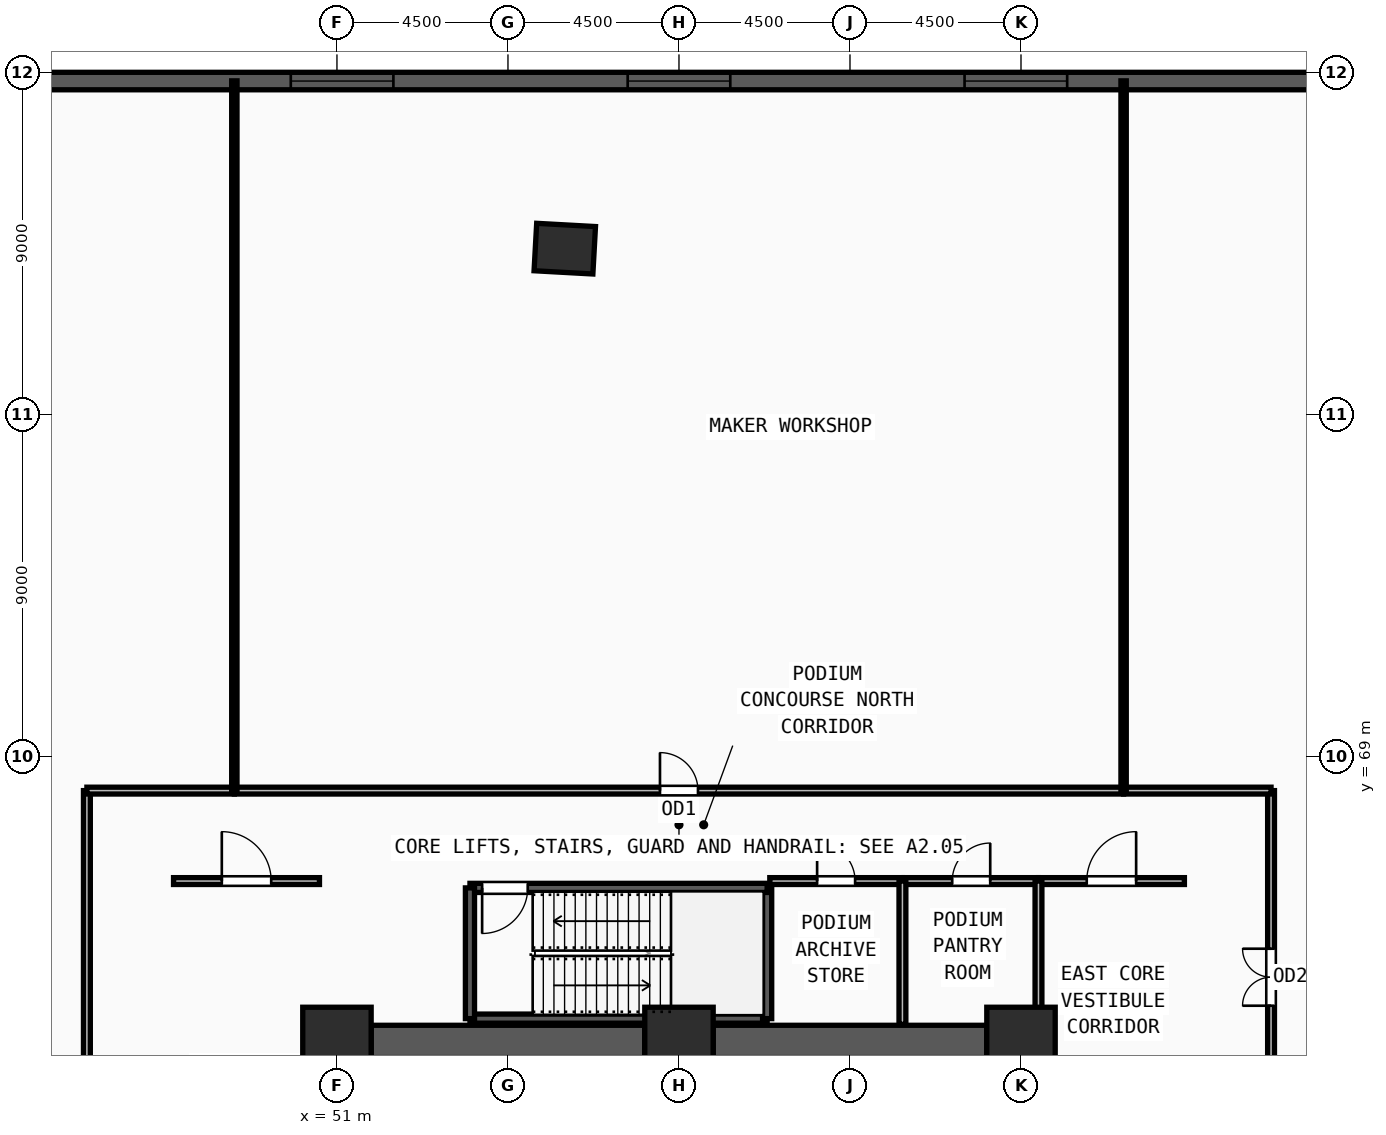
"""IFC4 building model, lengths in metres.
Left out: names, types, materials, properties, quantities, classifications, styles, units other than length and angle.
Written with IfcOpenShell. Run it as: python <this file> out.ifc"""

import sys

from ifc_helpers import new_model, si_unit, direction, frame, frame_2d, origin, origin_2d, place, context, subcontext, project, spatial, rectangle, extrude, source, transform, mapped, element, fill, save


model = new_model("IFC4")
c1 = context("Model", 3, precision=1e-05, world=origin(), true_north=direction((0.0, 1.0)))
c2 = subcontext(c1, "Body", "Model", "MODEL_VIEW")
j1 = project(units=[si_unit("LENGTHUNIT", "METRE"), si_unit("PLANEANGLEUNIT", "RADIAN")], contexts=[c1])
p1 = place(None, origin())
s1 = spatial("IfcSite", under=j1, at=p1, CompositionType="ELEMENT")
p2 = place(p1, origin())
s2 = spatial("IfcBuilding", under=s1, at=p2, CompositionType="ELEMENT")
p3 = place(p2, frame((0.0, 0.0, 18.9)))
s3 = spatial("IfcBuildingStorey", under=s2, at=p3, CompositionType="ELEMENT", Elevation=18.9)
m1 = source(origin(), c2, "Body", "SweptSolid", [
    extrude(rectangle(XDim=1.8, YDim=1.8, at=origin_2d()), origin(), (0.0, 0.0, 1.0), 4.5),
])
for number, where, z_axis, x_axis in (
    (1, (69.0, 61.5, 0.0), (0.0, 0.0, 1.0), (1.0, 0.0, 0.0)),
    (2, (60.0, 61.5, 0.0), (0.0, 0.0, 1.0), (1.0, 0.0, 0.0)),
    (3, (51.0, 61.5, 0.0), (0.0, 0.0, 1.0), (1.0, 0.0, 0.0)),
):
    element("IfcColumn", number, at=place(p3, frame(where, z_axis=z_axis, x_axis=x_axis)), inside=s3, PredefinedType="COLUMN", context=c2, shape_type="MappedRepresentation", body=[
        mapped(m1, transform((0.0, 0.0, 0.0), x_axis=(1.0, 0.0, 0.0), y_axis=(0.0, 1.0, 0.0), z_axis=(0.0, 0.0, 1.0), scale=1.0)),
    ])
m2 = source(origin(), c2, "Body", "SweptSolid", [
    extrude(rectangle(XDim=1.55, YDim=1.25, at=origin_2d()), origin(), (0.0, 0.0, 1.0), 4.5),
])
p4 = place(p3, frame((56.995, 82.36, 0.0), z_axis=(0.0, 0.0, 1.0), x_axis=(-0.998479491627, 0.055124448298, 0.0)))
e4 = element("IfcColumn", 4, at=p4, inside=s3, PredefinedType="COLUMN", context=c2, shape_type="MappedRepresentation", body=[
    mapped(m2, transform((0.0, 0.0, 0.0), x_axis=(1.0, 0.0, 0.0), y_axis=(0.0, 1.0, 0.0), z_axis=(0.0, 0.0, 1.0), scale=1.0)),
])
p5 = place(p3, frame((95.46, 86.77, 0.0), z_axis=(0.0, 0.0, 1.0), x_axis=(-1.0, 0.0, 0.0)))
e5 = element("IfcWall", 5, at=p5, inside=s3, PredefinedType="SOLIDWALL", context=c2, shape_type="SweptSolid", body=[
    extrude(rectangle(XDim=70.92, YDim=0.46, at=frame_2d((35.46, 0.0))), origin(), (0.0, 0.0, 1.0), 3.6),
])
m3 = source(origin(), c2, "Body", "SweptSolid", [
    extrude(rectangle(XDim=2.7, YDim=2.35, at=frame_2d((1.35, 1.175))), frame((0.0, 0.24, 0.0), z_axis=(0.0, -1.0, 0.0), x_axis=(1.0, 0.0, 0.0)), (0.0, 0.0, 1.0), 0.48),
])
p6 = place(p5, frame((7.515, 0.0, 0.55)))
e6 = element("IfcOpeningElement", 6, at=p6, cuts=e5, PredefinedType="OPENING", context=c2, shape_type="MappedRepresentation", body=[
    mapped(m3, transform((0.0, 0.0, 0.0), x_axis=(1.0, 0.0, 0.0), y_axis=(0.0, 1.0, 0.0), z_axis=(0.0, 0.0, 1.0), scale=1.0)),
])
p7 = place(p5, frame((25.245, 0.0, 0.55)))
e7 = element("IfcOpeningElement", 7, at=p7, cuts=e5, PredefinedType="OPENING", context=c2, shape_type="MappedRepresentation", body=[
    mapped(m3, transform((0.0, 0.0, 0.0), x_axis=(1.0, 0.0, 0.0), y_axis=(0.0, 1.0, 0.0), z_axis=(0.0, 0.0, 1.0), scale=1.0)),
])
p8 = place(p5, frame((34.11, 0.0, 0.55)))
e8 = element("IfcOpeningElement", 8, at=p8, cuts=e5, PredefinedType="OPENING", context=c2, shape_type="MappedRepresentation", body=[
    mapped(m3, transform((0.0, 0.0, 0.0), x_axis=(1.0, 0.0, 0.0), y_axis=(0.0, 1.0, 0.0), z_axis=(0.0, 0.0, 1.0), scale=1.0)),
])
p9 = place(p5, frame((42.975, 0.0, 0.55)))
e9 = element("IfcOpeningElement", 9, at=p9, cuts=e5, PredefinedType="OPENING", context=c2, shape_type="MappedRepresentation", body=[
    mapped(m3, transform((0.0, 0.0, 0.0), x_axis=(1.0, 0.0, 0.0), y_axis=(0.0, 1.0, 0.0), z_axis=(0.0, 0.0, 1.0), scale=1.0)),
])
p10 = place(p5, frame((60.705, 0.0, 0.55)))
e10 = element("IfcOpeningElement", 10, at=p10, cuts=e5, PredefinedType="OPENING", context=c2, shape_type="MappedRepresentation", body=[
    mapped(m3, transform((0.0, 0.0, 0.0), x_axis=(1.0, 0.0, 0.0), y_axis=(0.0, 1.0, 0.0), z_axis=(0.0, 0.0, 1.0), scale=1.0)),
])
for number, where, z_axis, x_axis in (
    (11, (51.9, 61.5, 0.0), (0.0, 0.0, 1.0), (1.0, 0.0, 0.0)),
    (12, (60.9, 61.5, 0.0), (0.0, 0.0, 1.0), (1.0, 0.0, 0.0)),
):
    element("IfcWall", number, at=place(p3, frame(where, z_axis=z_axis, x_axis=x_axis)), inside=s3, PredefinedType="SHEAR", context=c2, shape_type="SweptSolid", body=[
        extrude(rectangle(XDim=7.2, YDim=0.85, at=frame_2d((3.6, 0.0))), origin(), (0.0, 0.0, 1.0), 3.6),
    ])
p11 = place(p3, frame((54.5, 62.1, 0.0), z_axis=(0.0, 0.0, 1.0), x_axis=(1.0, 0.0, 0.0)))
e13 = element("IfcWall", 13, at=p11, inside=s3, PredefinedType="SOLIDWALL", context=c2, shape_type="SweptSolid", body=[
    extrude(rectangle(XDim=7.82, YDim=0.24, at=frame_2d((3.91, 0.0))), origin(), (0.0, 0.0, 1.0), 3.6),
])
p12 = place(p3, frame((62.32, 62.1, 0.0), z_axis=(0.0, 0.0, 1.0), x_axis=(0.0, 1.0, 0.0)))
e14 = element("IfcWall", 14, at=p12, inside=s3, PredefinedType="SOLIDWALL", context=c2, shape_type="SweptSolid", body=[
    extrude(rectangle(XDim=3.44, YDim=0.24, at=frame_2d((1.72, 0.0))), origin(), (0.0, 0.0, 1.0), 3.6),
])
p13 = place(p3, frame((62.32, 65.54, 0.0), z_axis=(0.0, 0.0, 1.0), x_axis=(-1.0, 0.0, 0.0)))
e15 = element("IfcWall", 15, at=p13, inside=s3, PredefinedType="SOLIDWALL", context=c2, shape_type="SweptSolid", body=[
    extrude(rectangle(XDim=7.82, YDim=0.24, at=frame_2d((3.91, 0.0))), origin(), (0.0, 0.0, 1.0), 3.6),
])
m4 = source(origin(), c2, "Body", "SweptSolid", [
    extrude(rectangle(XDim=1.2, YDim=2.2, at=frame_2d((0.6, 1.1))), frame((0.0, 0.13, 0.0), z_axis=(0.0, -1.0, 0.0), x_axis=(1.0, 0.0, 0.0)), (0.0, 0.0, 1.0), 0.26),
])
p14 = place(p13, frame((6.3, 0.0, 0.0)))
e16 = element("IfcOpeningElement", 16, at=p14, cuts=e15, PredefinedType="OPENING", context=c2, shape_type="MappedRepresentation", body=[
    mapped(m4, transform((0.0, 0.0, 0.0), x_axis=(1.0, 0.0, 0.0), y_axis=(0.0, 1.0, 0.0), z_axis=(0.0, 0.0, 1.0), scale=1.0)),
])
p15 = place(p3, frame((54.5, 65.54, 0.0), z_axis=(0.0, 0.0, 1.0), x_axis=(0.0, -1.0, 0.0)))
e17 = element("IfcWall", 17, at=p15, inside=s3, PredefinedType="SOLIDWALL", context=c2, shape_type="SweptSolid", body=[
    extrude(rectangle(XDim=3.44, YDim=0.24, at=frame_2d((1.72, 0.0))), origin(), (0.0, 0.0, 1.0), 3.6),
])
p16 = place(p3, frame((62.39, 65.72, 0.0), z_axis=(0.0, 0.0, 1.0), x_axis=(1.0, 0.0, 0.0)))
e18 = element("IfcWall", 18, at=p16, inside=s3, PredefinedType="PARTITIONING", context=c2, shape_type="SweptSolid", body=[
    extrude(rectangle(XDim=3.49, YDim=0.18, at=frame_2d((1.745, 0.0))), origin(), (0.0, 0.0, 1.0), 3.6),
])
m5 = source(origin(), c2, "Body", "SweptSolid", [
    extrude(rectangle(XDim=1.0, YDim=2.2, at=frame_2d((0.5, 1.1))), frame((0.0, 0.1, 0.0), z_axis=(0.0, -1.0, 0.0), x_axis=(1.0, 0.0, 0.0)), (0.0, 0.0, 1.0), 0.2),
])
p17 = place(p16, frame((1.245, 0.0, 0.0)))
e19 = element("IfcOpeningElement", 19, at=p17, cuts=e18, PredefinedType="OPENING", context=c2, shape_type="MappedRepresentation", body=[
    mapped(m5, transform((0.0, 0.0, 0.0), x_axis=(1.0, 0.0, 0.0), y_axis=(0.0, 1.0, 0.0), z_axis=(0.0, 0.0, 1.0), scale=1.0)),
])
p18 = place(p3, frame((65.92, 65.72, 0.0), z_axis=(0.0, 0.0, 1.0), x_axis=(1.0, 0.0, 0.0)))
e20 = element("IfcWall", 20, at=p18, inside=s3, PredefinedType="PARTITIONING", context=c2, shape_type="SweptSolid", body=[
    extrude(rectangle(XDim=3.54, YDim=0.18, at=frame_2d((1.77, 0.0))), origin(), (0.0, 0.0, 1.0), 3.6),
])
p19 = place(p18, frame((1.27, 0.0, 0.0)))
e21 = element("IfcOpeningElement", 21, at=p19, cuts=e20, PredefinedType="OPENING", context=c2, shape_type="MappedRepresentation", body=[
    mapped(m5, transform((0.0, 0.0, 0.0), x_axis=(1.0, 0.0, 0.0), y_axis=(0.0, 1.0, 0.0), z_axis=(0.0, 0.0, 1.0), scale=1.0)),
])
p20 = place(p3, frame((46.7, 65.72, 0.0), z_axis=(0.0, 0.0, 1.0), x_axis=(1.0, 0.0, 0.0)))
e22 = element("IfcWall", 22, at=p20, inside=s3, PredefinedType="PARTITIONING", context=c2, shape_type="SweptSolid", body=[
    extrude(rectangle(XDim=3.84, YDim=0.18, at=frame_2d((1.92, 0.0))), origin(), (0.0, 0.0, 1.0), 3.6),
])
m6 = source(origin(), c2, "Body", "SweptSolid", [
    extrude(rectangle(XDim=1.3, YDim=2.2, at=frame_2d((0.65, 1.1))), frame((0.0, 0.1, 0.0), z_axis=(0.0, -1.0, 0.0), x_axis=(1.0, 0.0, 0.0)), (0.0, 0.0, 1.0), 0.2),
])
p21 = place(p20, frame((1.27, 0.0, 0.0)))
e23 = element("IfcOpeningElement", 23, at=p21, cuts=e22, PredefinedType="OPENING", context=c2, shape_type="MappedRepresentation", body=[
    mapped(m6, transform((0.0, 0.0, 0.0), x_axis=(1.0, 0.0, 0.0), y_axis=(0.0, 1.0, 0.0), z_axis=(0.0, 0.0, 1.0), scale=1.0)),
])
p22 = place(p3, frame((69.46, 65.72, 0.0), z_axis=(0.0, 0.0, 1.0), x_axis=(1.0, 0.0, 0.0)))
e24 = element("IfcWall", 24, at=p22, inside=s3, PredefinedType="PARTITIONING", context=c2, shape_type="SweptSolid", body=[
    extrude(rectangle(XDim=3.84, YDim=0.18, at=frame_2d((1.92, 0.0))), origin(), (0.0, 0.0, 1.0), 3.6),
])
p23 = place(p22, frame((1.27, 0.0, 0.0)))
e25 = element("IfcOpeningElement", 25, at=p23, cuts=e24, PredefinedType="OPENING", context=c2, shape_type="MappedRepresentation", body=[
    mapped(m6, transform((0.0, 0.0, 0.0), x_axis=(1.0, 0.0, 0.0), y_axis=(0.0, 1.0, 0.0), z_axis=(0.0, 0.0, 1.0), scale=1.0)),
])
p24 = place(p3, frame((44.42, 46.1, 0.0), z_axis=(0.0, 0.0, 1.0), x_axis=(0.0, 1.0, 0.0)))
e26 = element("IfcWall", 26, at=p24, inside=s3, PredefinedType="PARTITIONING", context=c2, shape_type="SweptSolid", body=[
    extrude(rectangle(XDim=22.0, YDim=0.18, at=frame_2d((11.0, 0.0))), origin(), (0.0, 0.0, 1.0), 3.6),
])
m7 = source(origin(), c2, "Body", "SweptSolid", [
    extrude(rectangle(XDim=1.5, YDim=2.2, at=frame_2d((0.75, 1.1))), frame((0.0, 0.1, 0.0), z_axis=(0.0, -1.0, 0.0), x_axis=(1.0, 0.0, 0.0)), (0.0, 0.0, 1.0), 0.2),
])
p25 = place(p24, frame((10.25, 0.0, 0.0)))
e27 = element("IfcOpeningElement", 27, at=p25, cuts=e26, PredefinedType="OPENING", context=c2, shape_type="MappedRepresentation", body=[
    mapped(m7, transform((0.0, 0.0, 0.0), x_axis=(1.0, 0.0, 0.0), y_axis=(0.0, 1.0, 0.0), z_axis=(0.0, 0.0, 1.0), scale=1.0)),
])
p26 = place(p3, frame((75.58, 58.28, 0.0), z_axis=(0.0, 0.0, 1.0), x_axis=(0.0, 1.0, 0.0)))
e28 = element("IfcWall", 28, at=p26, inside=s3, PredefinedType="PARTITIONING", context=c2, shape_type="SweptSolid", body=[
    extrude(rectangle(XDim=9.82, YDim=0.18, at=frame_2d((4.91, 0.0))), origin(), (0.0, 0.0, 1.0), 3.6),
])
p27 = place(p26, frame((4.16, 0.0, 0.0)))
e29 = element("IfcOpeningElement", 29, at=p27, cuts=e28, PredefinedType="OPENING", context=c2, shape_type="MappedRepresentation", body=[
    mapped(m7, transform((0.0, 0.0, 0.0), x_axis=(1.0, 0.0, 0.0), y_axis=(0.0, 1.0, 0.0), z_axis=(0.0, 0.0, 1.0), scale=1.0)),
])
p28 = place(p3, frame((48.3, 68.1, 0.0), z_axis=(0.0, 0.0, 1.0), x_axis=(1.0, 0.0, 0.0)))
e30 = element("IfcWall", 30, at=p28, inside=s3, PredefinedType="PARTITIONING", context=c2, shape_type="SweptSolid", body=[
    extrude(rectangle(XDim=23.4, YDim=0.18, at=frame_2d((11.7, 0.0))), origin(), (0.0, 0.0, 1.0), 3.6),
])
p29 = place(p28, frame((11.2, 0.0, 0.0)))
e31 = element("IfcOpeningElement", 31, at=p29, cuts=e30, PredefinedType="OPENING", context=c2, shape_type="MappedRepresentation", body=[
    mapped(m5, transform((0.0, 0.0, 0.0), x_axis=(1.0, 0.0, 0.0), y_axis=(0.0, 1.0, 0.0), z_axis=(0.0, 0.0, 1.0), scale=1.0)),
])
for number, where, z_axis, x_axis in (
    (32, (44.42, 68.1, 0.0), (0.0, 0.0, 1.0), (1.0, 0.0, 0.0)),
    (33, (71.7, 68.1, 0.0), (0.0, 0.0, 1.0), (1.0, 0.0, 0.0)),
):
    element("IfcWall", number, at=place(p3, frame(where, z_axis=z_axis, x_axis=x_axis)), inside=s3, PredefinedType="PARTITIONING", context=c2, shape_type="SweptSolid", body=[
        extrude(rectangle(XDim=3.88, YDim=0.18, at=frame_2d((1.94, 0.0))), origin(), (0.0, 0.0, 1.0), 3.6),
    ])
for number, where, z_axis, x_axis in (
    (34, (48.3, 68.1, 0.0), (0.0, 0.0, 1.0), (0.0, 1.0, 0.0)),
    (35, (71.7, 68.1, 0.0), (0.0, 0.0, 1.0), (0.0, 1.0, 0.0)),
):
    element("IfcWall", number, at=place(p3, frame(where, z_axis=z_axis, x_axis=x_axis)), inside=s3, PredefinedType="PARTITIONING", context=c2, shape_type="SweptSolid", body=[
        extrude(rectangle(XDim=18.675, YDim=0.14, at=frame_2d((9.337, 0.0))), origin(), (0.0, 0.0, 1.0), 3.6),
    ])
for number, where, z_axis, x_axis in (
    (36, (65.88, 61.95, 0.0), (0.0, 0.0, 1.0), (0.0, 1.0, 0.0)),
    (37, (69.46, 61.95, 0.0), (0.0, 0.0, 1.0), (0.0, 1.0, 0.0)),
):
    element("IfcWall", number, at=place(p3, frame(where, z_axis=z_axis, x_axis=x_axis)), inside=s3, PredefinedType="PARTITIONING", context=c2, shape_type="SweptSolid", body=[
        extrude(rectangle(XDim=3.77, YDim=0.18, at=frame_2d((1.885, 0.0))), origin(), (0.0, 0.0, 1.0), 3.6),
    ])
m8 = source(origin(), c2, "Body", "SweptSolid", [
    extrude(rectangle(XDim=2.7, YDim=2.35, at=frame_2d((1.35, 1.175))), frame((0.0, 0.03, 0.0), z_axis=(0.0, -1.0, 0.0), x_axis=(1.0, 0.0, 0.0)), (0.0, 0.0, 1.0), 0.06),
])
p30 = place(p7, origin())
e38 = element("IfcWindow", 38, at=p30, inside=s3, PartitioningType="TRIPLE_PANEL_VERTICAL", PredefinedType="WINDOW", context=c2, shape_type="MappedRepresentation", body=[
    mapped(m8, transform((0.0, 0.0, 0.0), x_axis=(1.0, 0.0, 0.0), y_axis=(0.0, 1.0, 0.0), z_axis=(0.0, 0.0, 1.0), scale=1.0)),
])
fill(e7, e38)
p31 = place(p8, origin())
e39 = element("IfcWindow", 39, at=p31, inside=s3, PartitioningType="TRIPLE_PANEL_VERTICAL", PredefinedType="WINDOW", context=c2, shape_type="MappedRepresentation", body=[
    mapped(m8, transform((0.0, 0.0, 0.0), x_axis=(1.0, 0.0, 0.0), y_axis=(0.0, 1.0, 0.0), z_axis=(0.0, 0.0, 1.0), scale=1.0)),
])
fill(e8, e39)
p32 = place(p9, origin())
e40 = element("IfcWindow", 40, at=p32, inside=s3, PartitioningType="TRIPLE_PANEL_VERTICAL", PredefinedType="WINDOW", context=c2, shape_type="MappedRepresentation", body=[
    mapped(m8, transform((0.0, 0.0, 0.0), x_axis=(1.0, 0.0, 0.0), y_axis=(0.0, 1.0, 0.0), z_axis=(0.0, 0.0, 1.0), scale=1.0)),
])
fill(e9, e40)
m9 = source(origin(), c2, "Body", "SweptSolid", [
    extrude(rectangle(XDim=1.2, YDim=2.2, at=frame_2d((0.6, 1.1))), frame((0.0, 0.025, 0.0), z_axis=(0.0, -1.0, 0.0), x_axis=(1.0, 0.0, 0.0)), (0.0, 0.0, 1.0), 0.05),
])
p33 = place(p14, origin())
e41 = element("IfcDoor", 41, at=p33, inside=s3, OperationType="SINGLE_SWING_RIGHT", PredefinedType="DOOR", context=c2, shape_type="MappedRepresentation", body=[
    mapped(m9, transform((0.0, 0.0, 0.0), x_axis=(1.0, 0.0, 0.0), y_axis=(0.0, 1.0, 0.0), z_axis=(0.0, 0.0, 1.0), scale=1.0)),
])
fill(e16, e41)
m10 = source(origin(), c2, "Body", "SweptSolid", [
    extrude(rectangle(XDim=1.0, YDim=2.2, at=frame_2d((0.5, 1.1))), frame((0.0, 0.025, 0.0), z_axis=(0.0, -1.0, 0.0), x_axis=(1.0, 0.0, 0.0)), (0.0, 0.0, 1.0), 0.05),
])
p34 = place(p17, origin())
e42 = element("IfcDoor", 42, at=p34, inside=s3, OperationType="SINGLE_SWING_LEFT", PredefinedType="DOOR", context=c2, shape_type="MappedRepresentation", body=[
    mapped(m10, transform((0.0, 0.0, 0.0), x_axis=(1.0, 0.0, 0.0), y_axis=(0.0, 1.0, 0.0), z_axis=(0.0, 0.0, 1.0), scale=1.0)),
])
fill(e19, e42)
p35 = place(p19, origin())
e43 = element("IfcDoor", 43, at=p35, inside=s3, OperationType="SINGLE_SWING_RIGHT", PredefinedType="DOOR", context=c2, shape_type="MappedRepresentation", body=[
    mapped(m10, transform((0.0, 0.0, 0.0), x_axis=(1.0, 0.0, 0.0), y_axis=(0.0, 1.0, 0.0), z_axis=(0.0, 0.0, 1.0), scale=1.0)),
])
fill(e21, e43)
m11 = source(origin(), c2, "Body", "SweptSolid", [
    extrude(rectangle(XDim=1.3, YDim=2.2, at=frame_2d((0.65, 1.1))), frame((0.0, 0.025, 0.0), z_axis=(0.0, -1.0, 0.0), x_axis=(1.0, 0.0, 0.0)), (0.0, 0.0, 1.0), 0.05),
])
p36 = place(p21, origin())
e44 = element("IfcDoor", 44, at=p36, inside=s3, OperationType="SINGLE_SWING_LEFT", PredefinedType="DOOR", context=c2, shape_type="MappedRepresentation", body=[
    mapped(m11, transform((0.0, 0.0, 0.0), x_axis=(1.0, 0.0, 0.0), y_axis=(0.0, 1.0, 0.0), z_axis=(0.0, 0.0, 1.0), scale=1.0)),
])
fill(e23, e44)
p37 = place(p23, origin())
e45 = element("IfcDoor", 45, at=p37, inside=s3, OperationType="SINGLE_SWING_RIGHT", PredefinedType="DOOR", context=c2, shape_type="MappedRepresentation", body=[
    mapped(m11, transform((0.0, 0.0, 0.0), x_axis=(1.0, 0.0, 0.0), y_axis=(0.0, 1.0, 0.0), z_axis=(0.0, 0.0, 1.0), scale=1.0)),
])
fill(e25, e45)
m12 = source(origin(), c2, "Body", "SweptSolid", [
    extrude(rectangle(XDim=1.5, YDim=2.2, at=frame_2d((0.75, 1.1))), frame((0.0, 0.025, 0.0), z_axis=(0.0, -1.0, 0.0), x_axis=(1.0, 0.0, 0.0)), (0.0, 0.0, 1.0), 0.05),
])
p38 = place(p27, origin())
e46 = element("IfcDoor", 46, at=p38, inside=s3, OperationType="DOUBLE_DOOR_SINGLE_SWING", PredefinedType="DOOR", context=c2, shape_type="MappedRepresentation", body=[
    mapped(m12, transform((0.0, 0.0, 0.0), x_axis=(1.0, 0.0, 0.0), y_axis=(0.0, 1.0, 0.0), z_axis=(0.0, 0.0, 1.0), scale=1.0)),
])
fill(e29, e46)
p39 = place(p29, origin())
e47 = element("IfcDoor", 47, at=p39, inside=s3, OperationType="SINGLE_SWING_LEFT", PredefinedType="DOOR", context=c2, shape_type="MappedRepresentation", body=[
    mapped(m10, transform((0.0, 0.0, 0.0), x_axis=(1.0, 0.0, 0.0), y_axis=(0.0, 1.0, 0.0), z_axis=(0.0, 0.0, 1.0), scale=1.0)),
])
fill(e31, e47)
save(model, sys.argv[1])
